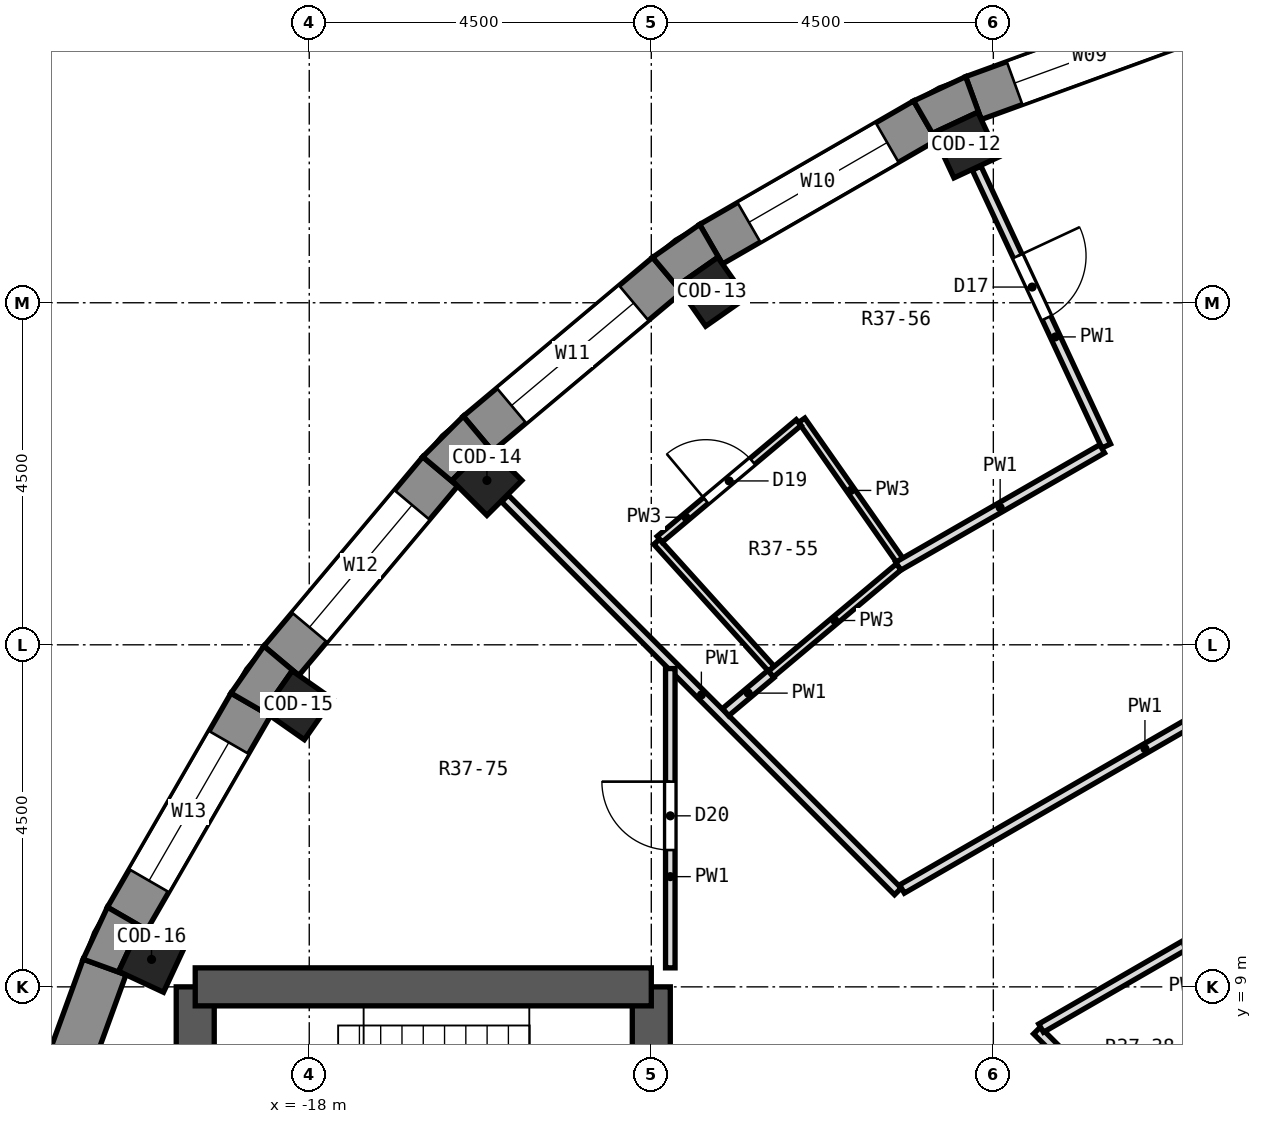
"""IFC4 building model, lengths in metres.
Left out: names, types, materials, properties, quantities, classifications, styles, units other than length and angle.
Written with IfcOpenShell. Run it as: python <this file> out.ifc"""

import sys

from ifc_helpers import new_model, si_unit, direction, frame, frame_2d, origin, origin_2d, place, context, subcontext, project, spatial, polyline, rectangle, outline, extrude, element, fill, save


model = new_model("IFC4")
c1 = context("Model", 3, precision=1e-05, world=origin(), true_north=direction((0.0, 1.0)))
c2 = subcontext(c1, "Body", "Model", "MODEL_VIEW")
j1 = project(units=[si_unit("LENGTHUNIT", "METRE"), si_unit("PLANEANGLEUNIT", "RADIAN")], contexts=[c1])
p1 = place(None, origin())
s1 = spatial("IfcSite", under=j1, at=p1, CompositionType="ELEMENT")
p2 = place(p1, origin())
s2 = spatial("IfcBuilding", under=s1, at=p2, CompositionType="ELEMENT")
p3 = place(p2, frame((0.0, 0.0, 269.3)))
s3 = spatial("IfcBuildingStorey", under=s2, at=p3, CompositionType="ELEMENT", Elevation=269.3)
for number, where, z_axis, x_axis in (
    (1, (-9.361, 20.075, 0.0), (0.0, 0.0, 1.0), (-0.423, 0.906, 0.0)),
    (2, (-12.705, 18.144, 0.0), (0.0, 0.0, 1.0), (-0.574, 0.819, 0.0)),
    (3, (-15.662, 15.662, 0.0), (0.0, 0.0, 1.0), (-0.707, 0.707, 0.0)),
    (4, (-18.144, 12.705, 0.0), (0.0, 0.0, 1.0), (-0.819, 0.574, 0.0)),
    (5, (-20.075, 9.361, 0.0), (0.0, 0.0, 1.0), (-0.906, 0.423, 0.0)),
):
    element("IfcColumn", number, at=place(p3, frame(where, z_axis=z_axis, x_axis=x_axis)), inside=s3, PredefinedType="COLUMN", context=c2, shape_type="SweptSolid", body=[
        extrude(rectangle(XDim=0.65, YDim=0.65, at=origin_2d()), origin(), (0.0, 0.0, 1.0), 3.3),
    ])
p4 = place(p3, frame((-13.5, -9.0, 0.0), z_axis=(0.0, 0.0, 1.0), x_axis=(0.0, 1.0, 0.0)))
e6 = element("IfcWall", 6, at=p4, inside=s3, PredefinedType="SHEAR", context=c2, shape_type="SweptSolid", body=[
    extrude(rectangle(XDim=18.0, YDim=0.5, at=frame_2d((9.0, 0.0))), origin(), (0.0, 0.0, 1.0), 3.3),
])
p5 = place(p4, frame((15.4, 0.0, 0.0)))
e7 = element("IfcOpeningElement", 7, at=p5, cuts=e6, PredefinedType="OPENING", context=c2, shape_type="SweptSolid", body=[
    extrude(rectangle(XDim=1.2, YDim=2.1, at=frame_2d((0.6, 1.05))), frame((0.0, 0.262, 0.0), z_axis=(0.0, -1.0, 0.0), x_axis=(1.0, 0.0, 0.0)), (0.0, 0.0, 1.0), 0.524),
])
p6 = place(p4, frame((1.4, 0.0, 0.0)))
e8 = element("IfcOpeningElement", 8, at=p6, cuts=e6, PredefinedType="OPENING", context=c2, shape_type="SweptSolid", body=[
    extrude(rectangle(XDim=1.2, YDim=2.1, at=frame_2d((0.6, 1.05))), frame((0.0, 0.262, 0.0), z_axis=(0.0, -1.0, 0.0), x_axis=(1.0, 0.0, 0.0)), (0.0, 0.0, 1.0), 0.524),
])
p7 = place(p4, frame((7.5, 0.0, 0.0)))
e9 = element("IfcOpeningElement", 9, at=p7, cuts=e6, PredefinedType="OPENING", context=c2, shape_type="SweptSolid", body=[
    extrude(rectangle(XDim=3.0, YDim=2.4, at=frame_2d((1.5, 1.2))), frame((0.0, 0.262, 0.0), z_axis=(0.0, -1.0, 0.0), x_axis=(1.0, 0.0, 0.0)), (0.0, 0.0, 1.0), 0.524),
])
p8 = place(p3, frame((-19.5, -9.0, 0.0), z_axis=(0.0, 0.0, 1.0), x_axis=(0.0, 1.0, 0.0)))
e10 = element("IfcWall", 10, at=p8, inside=s3, PredefinedType="SHEAR", context=c2, shape_type="SweptSolid", body=[
    extrude(rectangle(XDim=18.0, YDim=0.5, at=frame_2d((9.0, 0.0))), origin(), (0.0, 0.0, 1.0), 3.3),
])
p9 = place(p8, frame((9.45, 0.0, 0.0)))
e11 = element("IfcOpeningElement", 11, at=p9, cuts=e10, PredefinedType="OPENING", context=c2, shape_type="SweptSolid", body=[
    extrude(rectangle(XDim=0.9, YDim=2.1, at=frame_2d((0.45, 1.05))), frame((0.0, 0.262, 0.0), z_axis=(0.0, -1.0, 0.0), x_axis=(1.0, 0.0, 0.0)), (0.0, 0.0, 1.0), 0.524),
])
p10 = place(p8, frame((7.65, 0.0, 0.0)))
e12 = element("IfcOpeningElement", 12, at=p10, cuts=e10, PredefinedType="OPENING", context=c2, shape_type="SweptSolid", body=[
    extrude(rectangle(XDim=0.9, YDim=2.1, at=frame_2d((0.45, 1.05))), frame((0.0, 0.262, 0.0), z_axis=(0.0, -1.0, 0.0), x_axis=(1.0, 0.0, 0.0)), (0.0, 0.0, 1.0), 0.524),
])
p11 = place(p3, frame((-13.5, 9.0, 0.0), z_axis=(0.0, 0.0, 1.0), x_axis=(-1.0, 0.0, 0.0)))
e13 = element("IfcWall", 13, at=p11, inside=s3, PredefinedType="SHEAR", context=c2, shape_type="SweptSolid", body=[
    extrude(rectangle(XDim=6.0, YDim=0.5, at=frame_2d((3.0, 0.0))), origin(), (0.0, 0.0, 1.0), 3.3),
])
p12 = place(p3, frame((-6.206, 21.805, 0.0), z_axis=(0.0, 0.0, 1.0), x_axis=(-0.939679383794, -0.342056509473, 0.0)))
e14 = element("IfcWall", 14, at=p12, inside=s3, PredefinedType="SOLIDWALL", context=c2, shape_type="SweptSolid", body=[
    extrude(rectangle(XDim=3.252, YDim=0.6, at=frame_2d((1.626, 0.0))), origin(), (0.0, 0.0, 1.0), 2.9),
])
p13 = place(p12, frame((0.576, 0.0, 0.9)))
e15 = element("IfcOpeningElement", 15, at=p13, cuts=e14, PredefinedType="OPENING", context=c2, shape_type="SweptSolid", body=[
    extrude(rectangle(XDim=2.1, YDim=1.8, at=frame_2d((1.05, 0.9))), frame((0.0, 0.312, 0.0), z_axis=(0.0, -1.0, 0.0), x_axis=(1.0, 0.0, 0.0)), (0.0, 0.0, 1.0), 0.624),
])
p14 = place(p3, frame((-9.898, 20.396, 0.0), z_axis=(0.0, 0.0, 1.0), x_axis=(-0.866016800201, -0.500014901547, 0.0)))
e16 = element("IfcWall", 16, at=p14, inside=s3, PredefinedType="SOLIDWALL", context=c2, shape_type="SweptSolid", body=[
    extrude(rectangle(XDim=3.252, YDim=0.6, at=frame_2d((1.626, 0.0))), origin(), (0.0, 0.0, 1.0), 2.9),
])
p15 = place(p14, frame((0.576, 0.0, 0.9)))
e17 = element("IfcOpeningElement", 17, at=p15, cuts=e16, PredefinedType="OPENING", context=c2, shape_type="SweptSolid", body=[
    extrude(rectangle(XDim=2.1, YDim=1.8, at=frame_2d((1.05, 0.9))), frame((0.0, 0.312, 0.0), z_axis=(0.0, -1.0, 0.0), x_axis=(1.0, 0.0, 0.0)), (0.0, 0.0, 1.0), 0.624),
])
p16 = place(p3, frame((-13.29, 18.367, 0.0), z_axis=(0.0, 0.0, 1.0), x_axis=(-0.766056773982, -0.64277291405, 0.0)))
e18 = element("IfcWall", 18, at=p16, inside=s3, PredefinedType="SOLIDWALL", context=c2, shape_type="SweptSolid", body=[
    extrude(rectangle(XDim=3.252, YDim=0.6, at=frame_2d((1.626, 0.0))), origin(), (0.0, 0.0, 1.0), 2.9),
])
p17 = place(p16, frame((0.576, 0.0, 0.9)))
e19 = element("IfcOpeningElement", 19, at=p17, cuts=e18, PredefinedType="OPENING", context=c2, shape_type="SweptSolid", body=[
    extrude(rectangle(XDim=2.1, YDim=1.8, at=frame_2d((1.05, 0.9))), frame((0.0, 0.312, 0.0), z_axis=(0.0, -1.0, 0.0), x_axis=(1.0, 0.0, 0.0)), (0.0, 0.0, 1.0), 0.624),
])
p18 = place(p3, frame((-16.277, 15.781, 0.0), z_axis=(0.0, 0.0, 1.0), x_axis=(-0.64277291405, -0.766056773982, 0.0)))
e20 = element("IfcWall", 20, at=p18, inside=s3, PredefinedType="SOLIDWALL", context=c2, shape_type="SweptSolid", body=[
    extrude(rectangle(XDim=3.252, YDim=0.6, at=frame_2d((1.626, 0.0))), origin(), (0.0, 0.0, 1.0), 2.9),
])
p19 = place(p18, frame((0.576, 0.0, 0.9)))
e21 = element("IfcOpeningElement", 21, at=p19, cuts=e20, PredefinedType="OPENING", context=c2, shape_type="SweptSolid", body=[
    extrude(rectangle(XDim=2.1, YDim=1.8, at=frame_2d((1.05, 0.9))), frame((0.0, 0.312, 0.0), z_axis=(0.0, -1.0, 0.0), x_axis=(1.0, 0.0, 0.0)), (0.0, 0.0, 1.0), 0.624),
])
p20 = place(p3, frame((-18.77, 12.714, 0.0), z_axis=(0.0, 0.0, 1.0), x_axis=(-0.500014901547, -0.866016800201, 0.0)))
e22 = element("IfcWall", 22, at=p20, inside=s3, PredefinedType="SOLIDWALL", context=c2, shape_type="SweptSolid", body=[
    extrude(rectangle(XDim=3.252, YDim=0.6, at=frame_2d((1.626, 0.0))), origin(), (0.0, 0.0, 1.0), 2.9),
])
p21 = place(p20, frame((0.576, 0.0, 0.9)))
e23 = element("IfcOpeningElement", 23, at=p21, cuts=e22, PredefinedType="OPENING", context=c2, shape_type="SweptSolid", body=[
    extrude(rectangle(XDim=2.1, YDim=1.8, at=frame_2d((1.05, 0.9))), frame((0.0, 0.312, 0.0), z_axis=(0.0, -1.0, 0.0), x_axis=(1.0, 0.0, 0.0)), (0.0, 0.0, 1.0), 0.624),
])
p22 = place(p3, frame((-20.693, 9.262, 0.0), z_axis=(0.0, 0.0, 1.0), x_axis=(-0.342056509473, -0.939679383794, 0.0)))
e24 = element("IfcWall", 24, at=p22, inside=s3, PredefinedType="SOLIDWALL", context=c2, shape_type="SweptSolid", body=[
    extrude(rectangle(XDim=3.252, YDim=0.6, at=frame_2d((1.626, 0.0))), origin(), (0.0, 0.0, 1.0), 2.9),
])
p23 = place(p3, origin())
e25 = element("IfcWall", 25, at=p23, inside=s3, PredefinedType="SOLIDWALL", context=c2, shape_type="SweptSolid", body=[
    extrude(outline(polyline([(-9.364, 20.975), (-10.048, 20.656), (-9.748, 20.136), (-9.793, 20.232), (-9.204, 20.507), (-9.159, 20.411), (-9.364, 20.975)])), origin(), (0.0, 0.0, 1.0), 2.9),
])
p24 = place(p3, origin())
e26 = element("IfcWall", 26, at=p24, inside=s3, PredefinedType="SOLIDWALL", context=c2, shape_type="SweptSolid", body=[
    extrude(outline(polyline([(-12.864, 19.03), (-13.482, 18.597), (-13.097, 18.137), (-13.157, 18.224), (-12.625, 18.597), (-12.564, 18.51), (-12.864, 19.03)])), origin(), (0.0, 0.0, 1.0), 2.9),
])
p25 = place(p3, origin())
e27 = element("IfcWall", 27, at=p25, inside=s3, PredefinedType="SOLIDWALL", context=c2, shape_type="SweptSolid", body=[
    extrude(outline(polyline([(-16.507, 15.973), (-16.047, 15.588), (-16.122, 15.662), (-15.662, 16.122), (-15.588, 16.047), (-15.973, 16.507), (-16.507, 15.973)])), origin(), (0.0, 0.0, 1.0), 2.9),
])
p26 = place(p3, origin())
e28 = element("IfcWall", 28, at=p26, inside=s3, PredefinedType="SOLIDWALL", context=c2, shape_type="SweptSolid", body=[
    extrude(outline(polyline([(-19.03, 12.864), (-18.51, 12.564), (-18.597, 12.625), (-18.224, 13.157), (-18.137, 13.097), (-18.597, 13.482), (-19.03, 12.864)])), origin(), (0.0, 0.0, 1.0), 2.9),
])
p27 = place(p3, origin())
e29 = element("IfcWall", 29, at=p27, inside=s3, PredefinedType="SOLIDWALL", context=c2, shape_type="SweptSolid", body=[
    extrude(outline(polyline([(-20.656, 10.048), (-20.975, 9.364), (-20.411, 9.159), (-20.507, 9.204), (-20.232, 9.793), (-20.136, 9.748), (-20.656, 10.048)])), origin(), (0.0, 0.0, 1.0), 2.9),
])
p28 = place(p3, frame((-9.219, 19.771, 0.0), z_axis=(0.0, 0.0, 1.0), x_axis=(0.422689943865, -0.906274357662, 0.0)))
e30 = element("IfcWall", 30, at=p28, inside=s3, PredefinedType="PARTITIONING", context=c2, shape_type="SweptSolid", body=[
    extrude(rectangle(XDim=4.033, YDim=0.125, at=frame_2d((2.017, 0.0))), origin(), (0.0, 0.0, 1.0), 2.9),
])
p29 = place(p28, frame((1.276, 0.0, 0.0)))
e31 = element("IfcOpeningElement", 31, at=p29, cuts=e30, PredefinedType="OPENING", context=c2, shape_type="SweptSolid", body=[
    extrude(rectangle(XDim=0.9, YDim=2.1, at=frame_2d((0.45, 1.05))), frame((0.0, 0.074, 0.0), z_axis=(0.0, -1.0, 0.0), x_axis=(1.0, 0.0, 0.0)), (0.0, 0.0, 1.0), 0.149),
])
p30 = place(p3, frame((-11.521, 16.454, 0.0), z_axis=(0.0, 0.0, 1.0), x_axis=(0.573476881905, -0.819221744047, 0.0)))
e32 = element("IfcWall", 32, at=p30, inside=s3, PredefinedType="PARTITIONING", context=c2, shape_type="SweptSolid", body=[
    extrude(rectangle(XDim=2.254, YDim=0.1, at=frame_2d((1.127, 0.0))), origin(), (0.0, 0.0, 1.0), 2.9),
])
p31 = place(p3, frame((-13.429, 14.855, 0.0), z_axis=(0.0, 0.0, 1.0), x_axis=(0.670353689302, -0.742041731468, 0.0)))
e33 = element("IfcWall", 33, at=p31, inside=s3, PredefinedType="PARTITIONING", context=c2, shape_type="SweptSolid", body=[
    extrude(rectangle(XDim=2.251, YDim=0.1, at=frame_2d((1.125, 0.0))), origin(), (0.0, 0.0, 1.0), 2.9),
])
p32 = place(p3, frame((-15.426, 15.426, 0.0), z_axis=(0.0, 0.0, 1.0), x_axis=(0.707106781187, -0.707106781187, 0.0)))
e34 = element("IfcWall", 34, at=p32, inside=s3, PredefinedType="PARTITIONING", context=c2, shape_type="SweptSolid", body=[
    extrude(rectangle(XDim=7.311, YDim=0.125, at=frame_2d((3.655, 0.0))), origin(), (0.0, 0.0, 1.0), 2.9),
])
p33 = place(p3, frame((-8.426, 8.426, 0.0), z_axis=(0.0, 0.0, 1.0), x_axis=(0.707106781187, -0.707106781187, 0.0)))
e35 = element("IfcWall", 35, at=p33, inside=s3, PredefinedType="PARTITIONING", context=c2, shape_type="SweptSolid", body=[
    extrude(rectangle(XDim=2.474, YDim=0.125, at=frame_2d((1.237, 0.0))), origin(), (0.0, 0.0, 1.0), 2.9),
])
p34 = place(p3, frame((-10.253, 14.533, 0.0), z_axis=(0.0, 0.0, 1.0), x_axis=(0.86679387043, 0.498666608252, 0.0)))
e36 = element("IfcWall", 36, at=p34, inside=s3, PredefinedType="PARTITIONING", context=c2, shape_type="SweptSolid", body=[
    extrude(rectangle(XDim=3.097, YDim=0.125, at=frame_2d((1.549, 0.0))), origin(), (0.0, 0.0, 1.0), 2.9),
])
p35 = place(p3, frame((-8.372, 8.457, 0.0), z_axis=(0.0, 0.0, 1.0), x_axis=(0.866047390407, 0.499961916119, 0.0)))
e37 = element("IfcWall", 37, at=p35, inside=s3, PredefinedType="PARTITIONING", context=c2, shape_type="SweptSolid", body=[
    extrude(rectangle(XDim=6.031, YDim=0.125, at=frame_2d((3.015, 0.0))), origin(), (0.0, 0.0, 1.0), 2.9),
])
p36 = place(p35, frame((2.471, 0.0, 0.0)))
e38 = element("IfcOpeningElement", 38, at=p36, cuts=e37, PredefinedType="OPENING", context=c2, shape_type="SweptSolid", body=[
    extrude(rectangle(XDim=1.0, YDim=2.1, at=frame_2d((0.5, 1.05))), frame((0.0, 0.074, 0.0), z_axis=(0.0, -1.0, 0.0), x_axis=(1.0, 0.0, 0.0)), (0.0, 0.0, 1.0), 0.149),
])
p37 = place(p3, frame((-10.202, 10.287, 0.0), z_axis=(0.0, 0.0, 1.0), x_axis=(0.866028642731, 0.499994389938, 0.0)))
e39 = element("IfcWall", 39, at=p37, inside=s3, PredefinedType="PARTITIONING", context=c2, shape_type="SweptSolid", body=[
    extrude(rectangle(XDim=7.383, YDim=0.125, at=frame_2d((3.691, 0.0))), origin(), (0.0, 0.0, 1.0), 2.9),
])
p38 = place(p3, frame((-11.926, 13.115, 0.0), z_axis=(0.0, 0.0, 1.0), x_axis=(0.766119067307, 0.642698665557, 0.0)))
e40 = element("IfcWall", 40, at=p38, inside=s3, PredefinedType="PARTITIONING", context=c2, shape_type="SweptSolid", body=[
    extrude(rectangle(XDim=2.194, YDim=0.1, at=frame_2d((1.097, 0.0))), origin(), (0.0, 0.0, 1.0), 2.9),
])
p39 = place(p3, frame((-12.522, 12.614, 0.0), z_axis=(0.0, 0.0, 1.0), x_axis=(0.765618354165, 0.643295061201, 0.0)))
e41 = element("IfcWall", 41, at=p39, inside=s3, PredefinedType="PARTITIONING", context=c2, shape_type="SweptSolid", body=[
    extrude(rectangle(XDim=0.778, YDim=0.125, at=frame_2d((0.389, 0.0))), origin(), (0.0, 0.0, 1.0), 2.9),
])
p40 = place(p3, frame((-13.39, 14.889, 0.0), z_axis=(0.0, 0.0, 1.0), x_axis=(0.765894211942, 0.642966605753, 0.0)))
e42 = element("IfcWall", 42, at=p40, inside=s3, PredefinedType="PARTITIONING", context=c2, shape_type="SweptSolid", body=[
    extrude(rectangle(XDim=2.387, YDim=0.1, at=frame_2d((1.194, 0.0))), origin(), (0.0, 0.0, 1.0), 2.9),
])
p41 = place(p40, frame((0.793, 0.0, 0.0)))
e43 = element("IfcOpeningElement", 43, at=p41, cuts=e42, PredefinedType="OPENING", context=c2, shape_type="SweptSolid", body=[
    extrude(rectangle(XDim=0.8, YDim=2.1, at=frame_2d((0.4, 1.05))), frame((0.0, 0.062, 0.0), z_axis=(0.0, -1.0, 0.0), x_axis=(1.0, 0.0, 0.0)), (0.0, 0.0, 1.0), 0.124),
])
p42 = place(p3, frame((-13.25, 9.25, 0.0), z_axis=(0.0, 0.0, 1.0), x_axis=(0.0, 1.0, 0.0)))
e44 = element("IfcWall", 44, at=p42, inside=s3, PredefinedType="PARTITIONING", context=c2, shape_type="SweptSolid", body=[
    extrude(rectangle(XDim=3.938, YDim=0.125, at=frame_2d((1.969, 0.0))), origin(), (0.0, 0.0, 1.0), 2.9),
])
p43 = place(p42, frame((1.55, 0.0, 0.0)))
e45 = element("IfcOpeningElement", 45, at=p43, cuts=e44, PredefinedType="OPENING", context=c2, shape_type="SweptSolid", body=[
    extrude(rectangle(XDim=0.9, YDim=2.1, at=frame_2d((0.45, 1.05))), frame((0.0, 0.074, 0.0), z_axis=(0.0, -1.0, 0.0), x_axis=(1.0, 0.0, 0.0)), (0.0, 0.0, 1.0), 0.149),
])
p44 = place(p13, origin())
e46 = element("IfcWindow", 46, at=p44, inside=s3, PartitioningType="SINGLE_PANEL", PredefinedType="WINDOW", context=c2, shape_type="SweptSolid", body=[
    extrude(rectangle(XDim=2.1, YDim=1.8, at=frame_2d((1.05, 0.9))), frame((0.0, 0.18, 0.0), z_axis=(0.0, -1.0, 0.0), x_axis=(1.0, 0.0, 0.0)), (0.0, 0.0, 1.0), 0.06),
])
fill(e15, e46)
p45 = place(p15, origin())
e47 = element("IfcWindow", 47, at=p45, inside=s3, PartitioningType="SINGLE_PANEL", PredefinedType="WINDOW", context=c2, shape_type="SweptSolid", body=[
    extrude(rectangle(XDim=2.1, YDim=1.8, at=frame_2d((1.05, 0.9))), frame((0.0, 0.18, 0.0), z_axis=(0.0, -1.0, 0.0), x_axis=(1.0, 0.0, 0.0)), (0.0, 0.0, 1.0), 0.06),
])
fill(e17, e47)
p46 = place(p17, origin())
e48 = element("IfcWindow", 48, at=p46, inside=s3, PartitioningType="SINGLE_PANEL", PredefinedType="WINDOW", context=c2, shape_type="SweptSolid", body=[
    extrude(rectangle(XDim=2.1, YDim=1.8, at=frame_2d((1.05, 0.9))), frame((0.0, 0.18, 0.0), z_axis=(0.0, -1.0, 0.0), x_axis=(1.0, 0.0, 0.0)), (0.0, 0.0, 1.0), 0.06),
])
fill(e19, e48)
p47 = place(p19, origin())
e49 = element("IfcWindow", 49, at=p47, inside=s3, PartitioningType="SINGLE_PANEL", PredefinedType="WINDOW", context=c2, shape_type="SweptSolid", body=[
    extrude(rectangle(XDim=2.1, YDim=1.8, at=frame_2d((1.05, 0.9))), frame((0.0, 0.18, 0.0), z_axis=(0.0, -1.0, 0.0), x_axis=(1.0, 0.0, 0.0)), (0.0, 0.0, 1.0), 0.06),
])
fill(e21, e49)
p48 = place(p21, origin())
e50 = element("IfcWindow", 50, at=p48, inside=s3, PartitioningType="SINGLE_PANEL", PredefinedType="WINDOW", context=c2, shape_type="SweptSolid", body=[
    extrude(rectangle(XDim=2.1, YDim=1.8, at=frame_2d((1.05, 0.9))), frame((0.0, 0.18, 0.0), z_axis=(0.0, -1.0, 0.0), x_axis=(1.0, 0.0, 0.0)), (0.0, 0.0, 1.0), 0.06),
])
fill(e23, e50)
p49 = place(p29, origin())
e51 = element("IfcDoor", 51, at=p49, inside=s3, OperationType="SINGLE_SWING_LEFT", PredefinedType="DOOR", context=c2, shape_type="SweptSolid", body=[
    extrude(rectangle(XDim=0.9, YDim=2.1, at=frame_2d((0.45, 1.05))), frame((0.0, 0.025, 0.0), z_axis=(0.0, -1.0, 0.0), x_axis=(1.0, 0.0, 0.0)), (0.0, 0.0, 1.0), 0.05),
])
fill(e31, e51)
p50 = place(p41, origin())
e52 = element("IfcDoor", 52, at=p50, inside=s3, OperationType="SINGLE_SWING_LEFT", PredefinedType="DOOR", context=c2, shape_type="SweptSolid", body=[
    extrude(rectangle(XDim=0.8, YDim=2.1, at=frame_2d((0.4, 1.05))), frame((0.0, 0.025, 0.0), z_axis=(0.0, -1.0, 0.0), x_axis=(1.0, 0.0, 0.0)), (0.0, 0.0, 1.0), 0.05),
])
fill(e43, e52)
p51 = place(p43, origin())
e53 = element("IfcDoor", 53, at=p51, inside=s3, OperationType="SINGLE_SWING_RIGHT", PredefinedType="DOOR", context=c2, shape_type="SweptSolid", body=[
    extrude(rectangle(XDim=0.9, YDim=2.1, at=frame_2d((0.45, 1.05))), frame((0.0, 0.025, 0.0), z_axis=(0.0, -1.0, 0.0), x_axis=(1.0, 0.0, 0.0)), (0.0, 0.0, 1.0), 0.05),
])
fill(e45, e53)
save(model, sys.argv[1])
